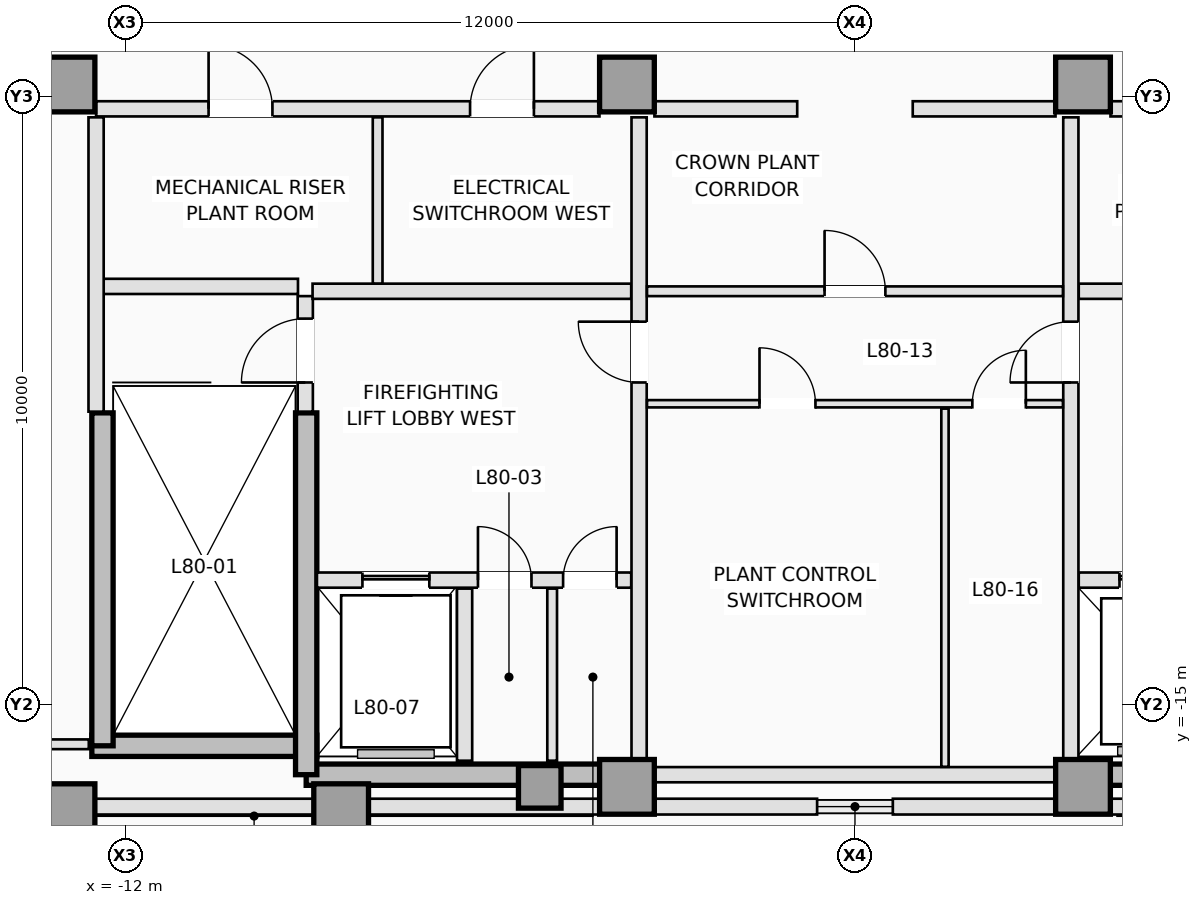
"""IFC4 building model, lengths in metres.
Left out: names, types, materials, properties, quantities, classifications, styles, units other than length and angle.
Written with IfcOpenShell. Run it as: python <this file> out.ifc"""

import sys

from ifc_helpers import new_model, si_unit, direction, frame, frame_2d, origin, origin_2d, place, context, subcontext, project, spatial, polyline, rectangle, outline, extrude, element, fill, save


model = new_model("IFC4")
c1 = context("Model", 3, precision=1e-05, world=origin(), true_north=direction((0.0, 1.0)))
c2 = subcontext(c1, "Body", "Model", "MODEL_VIEW")
j1 = project(units=[si_unit("LENGTHUNIT", "METRE"), si_unit("PLANEANGLEUNIT", "RADIAN")], contexts=[c1])
p1 = place(None, origin())
s1 = spatial("IfcSite", under=j1, at=p1, CompositionType="ELEMENT")
p2 = place(p1, origin())
s2 = spatial("IfcBuilding", under=s1, at=p2, CompositionType="ELEMENT")
p3 = place(p2, frame((0.0, 0.0, 286.9)))
s3 = spatial("IfcBuildingStorey", under=s2, at=p3, CompositionType="ELEMENT", Elevation=286.9)
p4 = place(p3, frame((-12.55, -15.675, 0.0), z_axis=(0.0, 0.0, 1.0), x_axis=(1.0, 0.0, 0.0)))
e1 = element("IfcWall", 1, at=p4, inside=s3, PredefinedType="SHEAR", context=c2, shape_type="SweptSolid", body=[
    extrude(rectangle(XDim=3.7, YDim=0.35, at=frame_2d((1.85, 0.0))), origin(), (0.0, 0.0, 1.0), 3.11),
])
for number, where, z_axis, x_axis in (
    (2, (-9.025, -16.15, 0.0), (0.0, 0.0, 1.0), (1.0, 0.0, 0.0)),
    (3, (3.75, -16.15, 0.0), (0.0, 0.0, 1.0), (1.0, 0.0, 0.0)),
):
    element("IfcWall", number, at=place(p3, frame(where, z_axis=z_axis, x_axis=x_axis)), inside=s3, PredefinedType="SHEAR", context=c2, shape_type="SweptSolid", body=[
        extrude(rectangle(XDim=5.275, YDim=0.35, at=frame_2d((2.637, 0.0))), origin(), (0.0, 0.0, 1.0), 3.013),
    ])
p5 = place(p3, frame((-12.375, -15.675, 0.0), z_axis=(0.0, 0.0, 1.0), x_axis=(0.0, 1.0, 0.0)))
e4 = element("IfcWall", 4, at=p5, inside=s3, PredefinedType="SHEAR", context=c2, shape_type="SweptSolid", body=[
    extrude(rectangle(XDim=5.475, YDim=0.35, at=frame_2d((2.738, 0.0))), origin(), (0.0, 0.0, 1.0), 3.11),
])
p6 = place(p3, frame((-9.025, -16.15, 0.0), z_axis=(0.0, 0.0, 1.0), x_axis=(0.0, 1.0, 0.0)))
e5 = element("IfcWall", 5, at=p6, inside=s3, PredefinedType="SHEAR", context=c2, shape_type="SweptSolid", body=[
    extrude(rectangle(XDim=5.95, YDim=0.35, at=frame_2d((2.975, 0.0))), origin(), (0.0, 0.0, 1.0), 3.013),
])
for number, where, z_axis, x_axis in (
    (6, (-12.95, -16.75, 0.0), (0.0, 0.0, 1.0), (1.0, 0.0, 0.0)),
    (7, (-8.45, -16.75, 0.0), (0.0, 0.0, 1.0), (1.0, 0.0, 0.0)),
):
    element("IfcColumn", number, at=place(p3, frame(where, z_axis=z_axis, x_axis=x_axis)), inside=s3, PredefinedType="COLUMN", context=c2, shape_type="SweptSolid", body=[
        extrude(rectangle(XDim=0.9, YDim=0.9, at=origin_2d()), origin(), (0.0, 0.0, 1.0), 2.891),
    ])
for number, where, z_axis, x_axis in (
    (8, (-3.75, -16.35, 0.0), (0.0, 0.0, 1.0), (1.0, 0.0, 0.0)),
    (9, (3.75, -16.35, 0.0), (0.0, 0.0, 1.0), (1.0, 0.0, 0.0)),
):
    element("IfcColumn", number, at=place(p3, frame(where, z_axis=z_axis, x_axis=x_axis)), inside=s3, PredefinedType="COLUMN", context=c2, shape_type="SweptSolid", body=[
        extrude(rectangle(XDim=0.9, YDim=0.9, at=origin_2d()), origin(), (0.0, 0.0, 1.0), 2.972),
    ])
for number, where, z_axis, x_axis in (
    (10, (-12.95, -4.8, 0.0), (0.0, 0.0, 1.0), (1.0, 0.0, 0.0)),
    (11, (-3.75, -4.8, 0.0), (0.0, 0.0, 1.0), (1.0, 0.0, 0.0)),
    (12, (3.75, -4.8, 0.0), (0.0, 0.0, 1.0), (1.0, 0.0, 0.0)),
):
    element("IfcColumn", number, at=place(p3, frame(where, z_axis=z_axis, x_axis=x_axis)), inside=s3, PredefinedType="COLUMN", context=c2, shape_type="SweptSolid", body=[
        extrude(rectangle(XDim=0.9, YDim=0.9, at=origin_2d()), origin(), (0.0, 0.0, 1.0), 5.322),
    ])
p7 = place(p3, frame((-5.184, -16.35, 0.0), z_axis=(0.0, 0.0, 1.0), x_axis=(0.0, 1.0, 0.0)))
e13 = element("IfcColumn", 13, at=p7, inside=s3, PredefinedType="COLUMN", context=c2, shape_type="SweptSolid", body=[
    extrude(rectangle(XDim=0.7, YDim=0.7, at=origin_2d()), origin(), (0.0, 0.0, 1.0), 2.972),
])
for number, where, z_axis, x_axis in (
    (14, (15.542, -16.675, 0.0), (0.0, 0.0, 1.0), (-1.0, 0.0, 0.0)),
    (15, (-4.22, -16.675, 0.0), (0.0, 0.0, 1.0), (-1.0, 0.0, 0.0)),
):
    element("IfcWall", number, at=place(p3, frame(where, z_axis=z_axis, x_axis=x_axis)), inside=s3, PredefinedType="STANDARD", context=c2, shape_type="SweptSolid", body=[
        extrude(outline(polyline([(0.0, 0.0), (11.323, 0.0), (11.323, 2.08), (0.0, 2.08), (0.0, 0.0)])), frame((0.0, 0.13, 0.0), z_axis=(0.0, -1.0, 0.0), x_axis=(1.0, 0.0, 0.0)), (0.0, 0.0, 1.0), 0.26),
    ])
for number, where, z_axis, x_axis in (
    (16, (3.28, -16.675, 0.0), (0.0, 0.0, 1.0), (-1.0, 0.0, 0.0)),
    (17, (-0.623, -16.675, 0.0), (0.0, 0.0, 1.0), (-1.0, 0.0, 0.0)),
):
    element("IfcWall", number, at=place(p3, frame(where, z_axis=z_axis, x_axis=x_axis)), inside=s3, PredefinedType="STANDARD", context=c2, shape_type="SweptSolid", body=[
        extrude(rectangle(XDim=2.657, YDim=0.26, at=frame_2d((1.329, 0.0))), origin(), (0.0, 0.0, 1.0), 2.916),
    ])
p8 = place(p3, frame((-18.292, -11.781, 0.0), z_axis=(0.0, 0.0, 1.0), x_axis=(0.490270316201, 0.871570431492, 0.0)))
e18 = element("IfcWall", 18, at=p8, inside=s3, PredefinedType="STANDARD", context=c2, shape_type="SweptSolid", body=[
    extrude(outline(polyline([(0.0, 0.0), (10.216, 0.0), (10.217, 5.723), (0.0, 3.912), (0.0, 0.0)])), frame((0.0, 0.13, 0.0), z_axis=(0.0, -1.0, 0.0), x_axis=(1.0, 0.0, 0.0)), (0.0, 0.0, 1.0), 0.26),
])
p9 = place(p3, frame((-9.04, -10.18, 0.0), z_axis=(0.0, 0.0, 1.0), x_axis=(0.0, 1.0, 0.0)))
e19 = element("IfcWall", 19, at=p9, inside=s3, PredefinedType="PARTITIONING", context=c2, shape_type="SweptSolid", body=[
    extrude(rectangle(XDim=1.9, YDim=0.25, at=frame_2d((0.95, 0.0))), origin(), (0.0, 0.0, 1.0), 2.833),
])
p10 = place(p9, frame((0.48, 0.0, 0.0)))
e20 = element("IfcOpeningElement", 20, at=p10, cuts=e19, PredefinedType="OPENING", context=c2, shape_type="SweptSolid", body=[
    extrude(rectangle(XDim=1.05, YDim=2.15, at=frame_2d((0.525, 1.075))), frame((0.0, 0.135, 0.0), z_axis=(0.0, -1.0, 0.0), x_axis=(1.0, 0.0, 0.0)), (0.0, 0.0, 1.0), 0.27),
])
p11 = place(p3, frame((-12.38, -8.12, 0.0), z_axis=(0.0, 0.0, 1.0), x_axis=(1.0, 0.0, 0.0)))
e21 = element("IfcWall", 21, at=p11, inside=s3, PredefinedType="PARTITIONING", context=c2, shape_type="SweptSolid", body=[
    extrude(rectangle(XDim=3.22, YDim=0.25, at=frame_2d((1.61, 0.0))), origin(), (0.0, 0.0, 1.0), 2.833),
])
p12 = place(p3, frame((-12.48, -10.18, 0.0), z_axis=(0.0, 0.0, 1.0), x_axis=(0.0, 1.0, 0.0)))
e22 = element("IfcWall", 22, at=p12, inside=s3, PredefinedType="PARTITIONING", context=c2, shape_type="SweptSolid", body=[
    extrude(rectangle(XDim=4.84, YDim=0.25, at=frame_2d((2.42, 0.0))), origin(), (0.0, 0.0, 1.0), 2.833),
])
p13 = place(p3, frame((-8.848, -12.95, 0.0), z_axis=(0.0, 0.0, 1.0), x_axis=(1.0, 0.0, 0.0)))
e23 = element("IfcWall", 23, at=p13, inside=s3, PredefinedType="PARTITIONING", context=c2, shape_type="SweptSolid", body=[
    extrude(rectangle(XDim=5.168, YDim=0.25, at=frame_2d((2.584, 0.0))), origin(), (0.0, 0.0, 1.0), 2.833),
])
p14 = place(p13, frame((0.748, 0.0, 0.0)))
e24 = element("IfcOpeningElement", 24, at=p14, cuts=e23, PredefinedType="OPENING", context=c2, shape_type="SweptSolid", body=[
    extrude(rectangle(XDim=1.1, YDim=2.15, at=frame_2d((0.55, 1.075))), frame((0.0, 0.135, 0.0), z_axis=(0.0, -1.0, 0.0), x_axis=(1.0, 0.0, 0.0)), (0.0, 0.0, 1.0), 0.27),
])
p15 = place(p13, frame((2.648, 0.0, 0.0)))
e25 = element("IfcOpeningElement", 25, at=p15, cuts=e23, PredefinedType="OPENING", context=c2, shape_type="SweptSolid", body=[
    extrude(rectangle(XDim=0.88, YDim=2.1, at=frame_2d((0.44, 1.05))), frame((0.0, 0.135, 0.0), z_axis=(0.0, -1.0, 0.0), x_axis=(1.0, 0.0, 0.0)), (0.0, 0.0, 1.0), 0.27),
])
p16 = place(p13, frame((4.048, 0.0, 0.0)))
e26 = element("IfcOpeningElement", 26, at=p16, cuts=e23, PredefinedType="OPENING", context=c2, shape_type="SweptSolid", body=[
    extrude(rectangle(XDim=0.88, YDim=2.1, at=frame_2d((0.44, 1.05))), frame((0.0, 0.135, 0.0), z_axis=(0.0, -1.0, 0.0), x_axis=(1.0, 0.0, 0.0)), (0.0, 0.0, 1.0), 0.27),
])
p17 = place(p3, frame((3.68, -12.95, 0.0), z_axis=(0.0, 0.0, 1.0), x_axis=(1.0, 0.0, 0.0)))
e27 = element("IfcWall", 27, at=p17, inside=s3, PredefinedType="PARTITIONING", context=c2, shape_type="SweptSolid", body=[
    extrude(rectangle(XDim=5.168, YDim=0.25, at=frame_2d((2.584, 0.0))), origin(), (0.0, 0.0, 1.0), 2.833),
])
p18 = place(p17, frame((3.32, 0.0, 0.0)))
e28 = element("IfcOpeningElement", 28, at=p18, cuts=e27, PredefinedType="OPENING", context=c2, shape_type="SweptSolid", body=[
    extrude(rectangle(XDim=1.1, YDim=2.15, at=frame_2d((0.55, 1.075))), frame((0.0, 0.135, 0.0), z_axis=(0.0, -1.0, 0.0), x_axis=(1.0, 0.0, 0.0)), (0.0, 0.0, 1.0), 0.27),
])
p19 = place(p17, frame((0.67, 0.0, 0.0)))
e29 = element("IfcOpeningElement", 29, at=p19, cuts=e27, PredefinedType="OPENING", context=c2, shape_type="SweptSolid", body=[
    extrude(rectangle(XDim=1.2, YDim=2.15, at=frame_2d((0.6, 1.075))), frame((0.0, 0.135, 0.0), z_axis=(0.0, -1.0, 0.0), x_axis=(1.0, 0.0, 0.0)), (0.0, 0.0, 1.0), 0.27),
])
p20 = place(p3, frame((-6.42, -15.92, 0.0), z_axis=(0.0, 0.0, 1.0), x_axis=(0.0, 1.0, 0.0)))
e30 = element("IfcWall", 30, at=p20, inside=s3, PredefinedType="PARTITIONING", context=c2, shape_type="SweptSolid", body=[
    extrude(rectangle(XDim=2.83, YDim=0.25, at=frame_2d((1.415, 0.0))), origin(), (0.0, 0.0, 1.0), 2.833),
])
p21 = place(p3, frame((-4.98, -15.92, 0.0), z_axis=(0.0, 0.0, 1.0), x_axis=(0.0, 1.0, 0.0)))
e31 = element("IfcWall", 31, at=p21, inside=s3, PredefinedType="PARTITIONING", context=c2, shape_type="SweptSolid", body=[
    extrude(rectangle(XDim=2.83, YDim=0.16, at=frame_2d((1.415, 0.0))), origin(), (0.0, 0.0, 1.0), 2.833),
])
for number, where, z_axis, x_axis in (
    (32, (-8.92, -8.2, 0.0), (0.0, 0.0, 1.0), (1.0, 0.0, 0.0)),
    (33, (3.68, -8.2, 0.0), (0.0, 0.0, 1.0), (1.0, 0.0, 0.0)),
):
    element("IfcWall", number, at=place(p3, frame(where, z_axis=z_axis, x_axis=x_axis)), inside=s3, PredefinedType="PARTITIONING", context=c2, shape_type="SweptSolid", body=[
        extrude(rectangle(XDim=5.24, YDim=0.25, at=frame_2d((2.62, 0.0))), origin(), (0.0, 0.0, 1.0), 2.833),
    ])
p22 = place(p3, frame((-3.55, -15.898, 0.0), z_axis=(0.0, 0.0, 1.0), x_axis=(0.0, 1.0, 0.0)))
e34 = element("IfcWall", 34, at=p22, inside=s3, PredefinedType="PARTITIONING", context=c2, shape_type="SweptSolid", body=[
    extrude(rectangle(XDim=10.558, YDim=0.25, at=frame_2d((5.279, 0.0))), origin(), (0.0, 0.0, 1.0), 2.833),
])
p23 = place(p22, frame((6.198, 0.0, 0.0)))
e35 = element("IfcOpeningElement", 35, at=p23, cuts=e34, PredefinedType="OPENING", context=c2, shape_type="SweptSolid", body=[
    extrude(rectangle(XDim=1.0, YDim=2.15, at=frame_2d((0.5, 1.075))), frame((0.0, 0.135, 0.0), z_axis=(0.0, -1.0, 0.0), x_axis=(1.0, 0.0, 0.0)), (0.0, 0.0, 1.0), 0.27),
])
p24 = place(p3, frame((3.55, -15.898, 0.0), z_axis=(0.0, 0.0, 1.0), x_axis=(0.0, 1.0, 0.0)))
e36 = element("IfcWall", 36, at=p24, inside=s3, PredefinedType="PARTITIONING", context=c2, shape_type="SweptSolid", body=[
    extrude(rectangle(XDim=10.558, YDim=0.25, at=frame_2d((5.279, 0.0))), origin(), (0.0, 0.0, 1.0), 2.833),
])
p25 = place(p24, frame((6.198, 0.0, 0.0)))
e37 = element("IfcOpeningElement", 37, at=p25, cuts=e36, PredefinedType="OPENING", context=c2, shape_type="SweptSolid", body=[
    extrude(rectangle(XDim=1.0, YDim=2.15, at=frame_2d((0.5, 1.075))), frame((0.0, 0.135, 0.0), z_axis=(0.0, -1.0, 0.0), x_axis=(1.0, 0.0, 0.0)), (0.0, 0.0, 1.0), 0.27),
])
p26 = place(p3, frame((-12.48, -5.2, 0.0), z_axis=(0.0, 0.0, 1.0), x_axis=(1.0, 0.0, 0.0)))
e38 = element("IfcWall", 38, at=p26, inside=s3, PredefinedType="PARTITIONING", context=c2, shape_type="SweptSolid", body=[
    extrude(rectangle(XDim=8.278, YDim=0.25, at=frame_2d((4.139, 0.0))), origin(), (0.0, 0.0, 1.0), 2.833),
])
p27 = place(p26, frame((1.85, 0.0, 0.0)))
e39 = element("IfcOpeningElement", 39, at=p27, cuts=e38, PredefinedType="OPENING", context=c2, shape_type="SweptSolid", body=[
    extrude(rectangle(XDim=1.05, YDim=2.12, at=frame_2d((0.525, 1.06))), frame((0.0, 0.135, 0.0), z_axis=(0.0, -1.0, 0.0), x_axis=(1.0, 0.0, 0.0)), (0.0, 0.0, 1.0), 0.27),
])
p28 = place(p26, frame((6.15, 0.0, 0.0)))
e40 = element("IfcOpeningElement", 40, at=p28, cuts=e38, PredefinedType="OPENING", context=c2, shape_type="SweptSolid", body=[
    extrude(rectangle(XDim=1.05, YDim=2.12, at=frame_2d((0.525, 1.06))), frame((0.0, 0.135, 0.0), z_axis=(0.0, -1.0, 0.0), x_axis=(1.0, 0.0, 0.0)), (0.0, 0.0, 1.0), 0.27),
])
p29 = place(p3, frame((4.202, -5.2, 0.0), z_axis=(0.0, 0.0, 1.0), x_axis=(1.0, 0.0, 0.0)))
e41 = element("IfcWall", 41, at=p29, inside=s3, PredefinedType="PARTITIONING", context=c2, shape_type="SweptSolid", body=[
    extrude(rectangle(XDim=8.278, YDim=0.25, at=frame_2d((4.139, 0.0))), origin(), (0.0, 0.0, 1.0), 2.833),
])
p30 = place(p29, frame((3.148, 0.0, 0.0)))
e42 = element("IfcOpeningElement", 42, at=p30, cuts=e41, PredefinedType="OPENING", context=c2, shape_type="SweptSolid", body=[
    extrude(rectangle(XDim=1.05, YDim=2.12, at=frame_2d((0.525, 1.06))), frame((0.0, 0.135, 0.0), z_axis=(0.0, -1.0, 0.0), x_axis=(1.0, 0.0, 0.0)), (0.0, 0.0, 1.0), 0.27),
])
for number, where, z_axis, x_axis in (
    (43, (-3.298, -5.2, 0.0), (0.0, 0.0, 1.0), (1.0, 0.0, 0.0)),
    (44, (0.95, -5.2, 0.0), (0.0, 0.0, 1.0), (1.0, 0.0, 0.0)),
):
    element("IfcWall", number, at=place(p3, frame(where, z_axis=z_axis, x_axis=x_axis)), inside=s3, PredefinedType="PARTITIONING", context=c2, shape_type="SweptSolid", body=[
        extrude(rectangle(XDim=2.348, YDim=0.25, at=frame_2d((1.174, 0.0))), origin(), (0.0, 0.0, 1.0), 2.833),
    ])
p31 = place(p3, frame((-7.85, -8.073, 0.0), z_axis=(0.0, 0.0, 1.0), x_axis=(0.0, 1.0, 0.0)))
e45 = element("IfcWall", 45, at=p31, inside=s3, PredefinedType="PARTITIONING", context=c2, shape_type="SweptSolid", body=[
    extrude(rectangle(XDim=2.733, YDim=0.16, at=frame_2d((1.366, 0.0))), origin(), (0.0, 0.0, 1.0), 2.833),
])
p32 = place(p3, frame((-3.298, -16.15, 0.0), z_axis=(0.0, 0.0, 1.0), x_axis=(1.0, 0.0, 0.0)))
e46 = element("IfcWall", 46, at=p32, inside=s3, PredefinedType="PARTITIONING", context=c2, shape_type="SweptSolid", body=[
    extrude(rectangle(XDim=6.596, YDim=0.25, at=frame_2d((3.298, 0.0))), origin(), (0.0, 0.0, 1.0), 2.427),
])
p33 = place(p3, frame((-3.42, -8.2, 0.0), z_axis=(0.0, 0.0, 1.0), x_axis=(1.0, 0.0, 0.0)))
e47 = element("IfcWall", 47, at=p33, inside=s3, PredefinedType="PARTITIONING", context=c2, shape_type="SweptSolid", body=[
    extrude(rectangle(XDim=6.84, YDim=0.16, at=frame_2d((3.42, 0.0))), origin(), (0.0, 0.0, 1.0), 2.833),
])
p34 = place(p33, frame((2.92, 0.0, 0.0)))
e48 = element("IfcOpeningElement", 48, at=p34, cuts=e47, PredefinedType="OPENING", context=c2, shape_type="SweptSolid", body=[
    extrude(rectangle(XDim=1.0, YDim=2.15, at=frame_2d((0.5, 1.075))), frame((0.0, 0.09, 0.0), z_axis=(0.0, -1.0, 0.0), x_axis=(1.0, 0.0, 0.0)), (0.0, 0.0, 1.0), 0.18),
])
p35 = place(p3, frame((-3.42, -10.05, 0.0), z_axis=(0.0, 0.0, 1.0), x_axis=(1.0, 0.0, 0.0)))
e49 = element("IfcWall", 49, at=p35, inside=s3, PredefinedType="PARTITIONING", context=c2, shape_type="SweptSolid", body=[
    extrude(rectangle(XDim=6.84, YDim=0.12, at=frame_2d((3.42, 0.0))), origin(), (0.0, 0.0, 1.0), 2.833),
])
p36 = place(p35, frame((1.85, 0.0, 0.0)))
e50 = element("IfcOpeningElement", 50, at=p36, cuts=e49, PredefinedType="OPENING", context=c2, shape_type="SweptSolid", body=[
    extrude(rectangle(XDim=0.92, YDim=2.12, at=frame_2d((0.46, 1.06))), frame((0.0, 0.07, 0.0), z_axis=(0.0, -1.0, 0.0), x_axis=(1.0, 0.0, 0.0)), (0.0, 0.0, 1.0), 0.14),
])
p37 = place(p35, frame((5.35, 0.0, 0.0)))
e51 = element("IfcOpeningElement", 51, at=p37, cuts=e49, PredefinedType="OPENING", context=c2, shape_type="SweptSolid", body=[
    extrude(rectangle(XDim=0.88, YDim=2.12, at=frame_2d((0.44, 1.06))), frame((0.0, 0.07, 0.0), z_axis=(0.0, -1.0, 0.0), x_axis=(1.0, 0.0, 0.0)), (0.0, 0.0, 1.0), 0.14),
])
p38 = place(p3, frame((1.48, -16.02, 0.0), z_axis=(0.0, 0.0, 1.0), x_axis=(0.0, 1.0, 0.0)))
e52 = element("IfcWall", 52, at=p38, inside=s3, PredefinedType="PARTITIONING", context=c2, shape_type="SweptSolid", body=[
    extrude(rectangle(XDim=5.89, YDim=0.12, at=frame_2d((2.945, 0.0))), origin(), (0.0, 0.0, 1.0), 2.833),
])
p39 = place(p3, frame((-15.743, -15.65, 0.0), z_axis=(0.0, 0.0, 1.0), x_axis=(1.0, 0.0, 0.0)))
e53 = element("IfcWall", 53, at=p39, inside=s3, PredefinedType="PARTITIONING", context=c2, shape_type="SweptSolid", body=[
    extrude(rectangle(XDim=3.143, YDim=0.16, at=frame_2d((1.571, 0.0))), origin(), (0.0, 0.0, 1.0), 2.833),
])
p40 = place(p14, origin())
e54 = element("IfcDoor", 54, at=p40, inside=s3, OperationType="SLIDING_TO_LEFT", PredefinedType="DOOR", context=c2, shape_type="SweptSolid", body=[
    extrude(rectangle(XDim=1.1, YDim=2.15, at=frame_2d((0.55, 1.075))), frame((0.0, 0.025, 0.0), z_axis=(0.0, -1.0, 0.0), x_axis=(1.0, 0.0, 0.0)), (0.0, 0.0, 1.0), 0.05),
])
fill(e24, e54)
p41 = place(p19, origin())
e55 = element("IfcDoor", 55, at=p41, inside=s3, OperationType="SLIDING_TO_LEFT", PredefinedType="DOOR", context=c2, shape_type="SweptSolid", body=[
    extrude(rectangle(XDim=1.2, YDim=2.15, at=frame_2d((0.6, 1.075))), frame((0.0, 0.025, 0.0), z_axis=(0.0, -1.0, 0.0), x_axis=(1.0, 0.0, 0.0)), (0.0, 0.0, 1.0), 0.05),
])
fill(e29, e55)
p42 = place(p10, origin())
e56 = element("IfcDoor", 56, at=p42, inside=s3, OperationType="SINGLE_SWING_LEFT", PredefinedType="DOOR", context=c2, shape_type="SweptSolid", body=[
    extrude(rectangle(XDim=1.05, YDim=2.15, at=frame_2d((0.525, 1.075))), frame((0.0, 0.025, 0.0), z_axis=(0.0, -1.0, 0.0), x_axis=(1.0, 0.0, 0.0)), (0.0, 0.0, 1.0), 0.05),
])
fill(e20, e56)
p43 = place(p15, origin())
e57 = element("IfcDoor", 57, at=p43, inside=s3, OperationType="SINGLE_SWING_LEFT", PredefinedType="TRAPDOOR", context=c2, shape_type="SweptSolid", body=[
    extrude(rectangle(XDim=0.88, YDim=2.1, at=frame_2d((0.44, 1.05))), frame((0.0, 0.025, 0.0), z_axis=(0.0, -1.0, 0.0), x_axis=(1.0, 0.0, 0.0)), (0.0, 0.0, 1.0), 0.05),
])
fill(e25, e57)
p44 = place(p16, origin())
e58 = element("IfcDoor", 58, at=p44, inside=s3, OperationType="SINGLE_SWING_RIGHT", PredefinedType="TRAPDOOR", context=c2, shape_type="SweptSolid", body=[
    extrude(rectangle(XDim=0.88, YDim=2.1, at=frame_2d((0.44, 1.05))), frame((0.0, 0.025, 0.0), z_axis=(0.0, -1.0, 0.0), x_axis=(1.0, 0.0, 0.0)), (0.0, 0.0, 1.0), 0.05),
])
fill(e26, e58)
p45 = place(p23, origin())
e59 = element("IfcDoor", 59, at=p45, inside=s3, OperationType="SINGLE_SWING_RIGHT", PredefinedType="DOOR", context=c2, shape_type="SweptSolid", body=[
    extrude(rectangle(XDim=1.0, YDim=2.15, at=frame_2d((0.5, 1.075))), frame((0.0, 0.025, 0.0), z_axis=(0.0, -1.0, 0.0), x_axis=(1.0, 0.0, 0.0)), (0.0, 0.0, 1.0), 0.05),
])
fill(e35, e59)
p46 = place(p25, origin())
e60 = element("IfcDoor", 60, at=p46, inside=s3, OperationType="SINGLE_SWING_LEFT", PredefinedType="DOOR", context=c2, shape_type="SweptSolid", body=[
    extrude(rectangle(XDim=1.0, YDim=2.15, at=frame_2d((0.5, 1.075))), frame((0.0, 0.025, 0.0), z_axis=(0.0, -1.0, 0.0), x_axis=(1.0, 0.0, 0.0)), (0.0, 0.0, 1.0), 0.05),
])
fill(e37, e60)
p47 = place(p27, origin())
e61 = element("IfcDoor", 61, at=p47, inside=s3, OperationType="SINGLE_SWING_LEFT", PredefinedType="DOOR", context=c2, shape_type="SweptSolid", body=[
    extrude(rectangle(XDim=1.05, YDim=2.12, at=frame_2d((0.525, 1.06))), frame((0.0, 0.025, 0.0), z_axis=(0.0, -1.0, 0.0), x_axis=(1.0, 0.0, 0.0)), (0.0, 0.0, 1.0), 0.05),
])
fill(e39, e61)
p48 = place(p28, origin())
e62 = element("IfcDoor", 62, at=p48, inside=s3, OperationType="SINGLE_SWING_RIGHT", PredefinedType="DOOR", context=c2, shape_type="SweptSolid", body=[
    extrude(rectangle(XDim=1.05, YDim=2.12, at=frame_2d((0.525, 1.06))), frame((0.0, 0.025, 0.0), z_axis=(0.0, -1.0, 0.0), x_axis=(1.0, 0.0, 0.0)), (0.0, 0.0, 1.0), 0.05),
])
fill(e40, e62)
p49 = place(p34, origin())
e63 = element("IfcDoor", 63, at=p49, inside=s3, OperationType="SINGLE_SWING_LEFT", PredefinedType="DOOR", context=c2, shape_type="SweptSolid", body=[
    extrude(rectangle(XDim=1.0, YDim=2.15, at=frame_2d((0.5, 1.075))), frame((0.0, 0.025, 0.0), z_axis=(0.0, -1.0, 0.0), x_axis=(1.0, 0.0, 0.0)), (0.0, 0.0, 1.0), 0.05),
])
fill(e48, e63)
p50 = place(p36, origin())
e64 = element("IfcDoor", 64, at=p50, inside=s3, OperationType="SINGLE_SWING_LEFT", PredefinedType="DOOR", context=c2, shape_type="SweptSolid", body=[
    extrude(rectangle(XDim=0.92, YDim=2.12, at=frame_2d((0.46, 1.06))), frame((0.0, 0.025, 0.0), z_axis=(0.0, -1.0, 0.0), x_axis=(1.0, 0.0, 0.0)), (0.0, 0.0, 1.0), 0.05),
])
fill(e50, e64)
p51 = place(p37, origin())
e65 = element("IfcDoor", 65, at=p51, inside=s3, OperationType="SINGLE_SWING_RIGHT", PredefinedType="DOOR", context=c2, shape_type="SweptSolid", body=[
    extrude(rectangle(XDim=0.88, YDim=2.12, at=frame_2d((0.44, 1.06))), frame((0.0, 0.025, 0.0), z_axis=(0.0, -1.0, 0.0), x_axis=(1.0, 0.0, 0.0)), (0.0, 0.0, 1.0), 0.05),
])
fill(e51, e65)
save(model, sys.argv[1])
